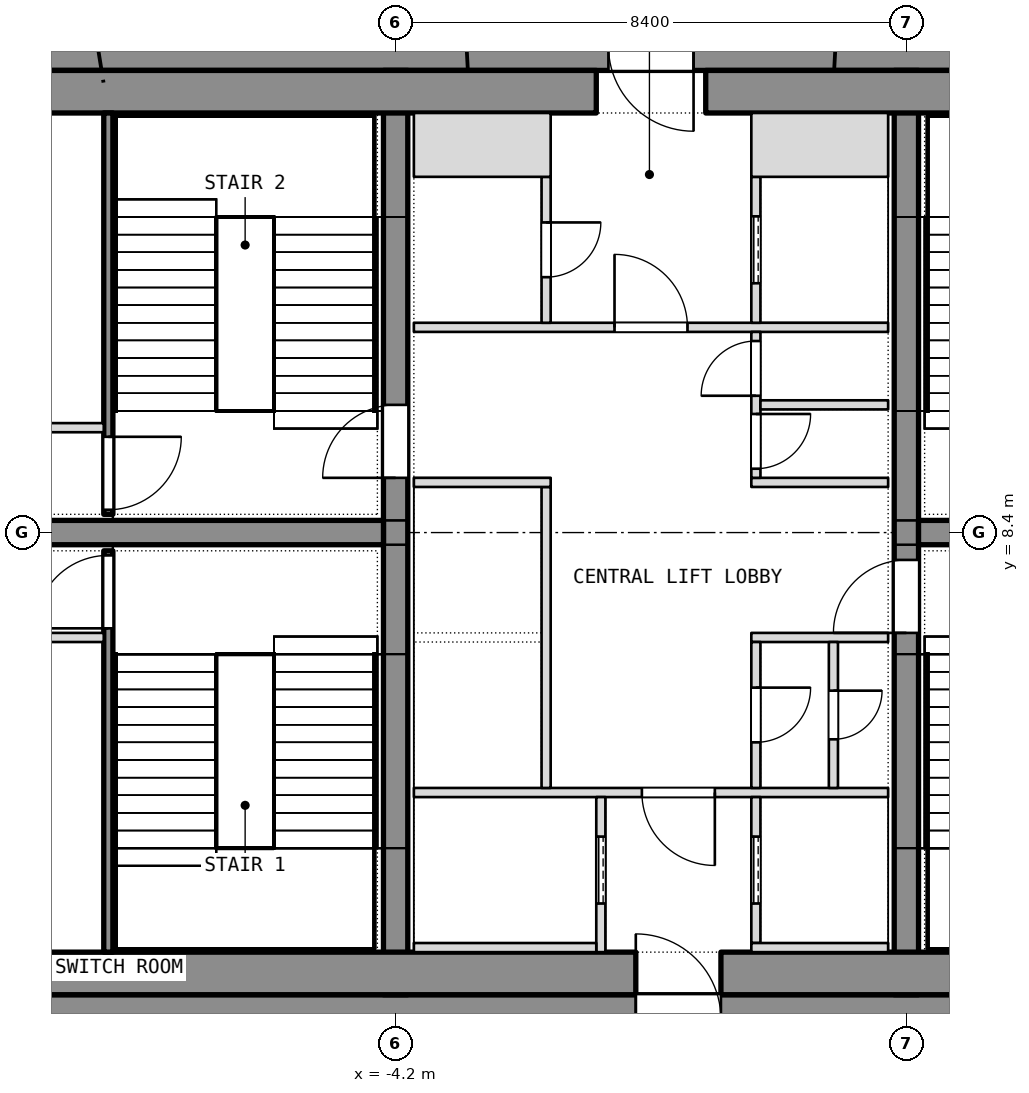
"""IFC4 building model, lengths in metres.
Left out: names, types, materials, properties, quantities, classifications, styles, units other than length and angle.
Written with IfcOpenShell. Run it as: python <this file> out.ifc"""

import sys

from ifc_helpers import new_model, si_unit, direction, frame, frame_2d, origin, place, context, subcontext, project, spatial, rectangle, extrude, element, fill, save


model = new_model("IFC4")
c1 = context("Model", 3, precision=1e-05, world=origin(), true_north=direction((0.0, 1.0)))
c2 = subcontext(c1, "Body", "Model", "MODEL_VIEW")
j1 = project(units=[si_unit("LENGTHUNIT", "METRE"), si_unit("PLANEANGLEUNIT", "RADIAN")], contexts=[c1])
p1 = place(None, origin())
s1 = spatial("IfcSite", under=j1, at=p1, CompositionType="ELEMENT")
p2 = place(p1, origin())
s2 = spatial("IfcBuilding", under=s1, at=p2, CompositionType="ELEMENT")
p3 = place(p2, frame((0.0, 0.0, 252.5)))
s3 = spatial("IfcBuildingStorey", under=s2, at=p3, CompositionType="ELEMENT", Elevation=252.5)
p4 = place(p3, frame((-11.1, 0.4, 0.0), z_axis=(0.0, 0.0, 1.0), x_axis=(1.0, 0.0, 0.0)))
e1 = element("IfcWall", 1, at=p4, inside=s3, PredefinedType="SHEAR", context=c2, shape_type="SweptSolid", body=[
    extrude(rectangle(XDim=22.2, YDim=0.8, at=frame_2d((11.1, 0.0))), origin(), (0.0, 0.0, 1.0), 14.4),
])
p5 = place(p4, frame((10.85, 0.0, 0.0)))
e2 = element("IfcOpeningElement", 2, at=p5, cuts=e1, PredefinedType="OPENING", context=c2, shape_type="SweptSolid", body=[
    extrude(rectangle(XDim=1.4, YDim=2.1, at=frame_2d((0.7, 1.05))), frame((0.0, 0.4, 0.0), z_axis=(0.0, -1.0, 0.0), x_axis=(1.0, 0.0, 0.0)), (0.0, 0.0, 1.0), 0.8),
])
p6 = place(p3, frame((-11.1, 16.4, 0.0), z_axis=(0.0, 0.0, 1.0), x_axis=(1.0, 0.0, 0.0)))
e3 = element("IfcWall", 3, at=p6, inside=s3, PredefinedType="SHEAR", context=c2, shape_type="SweptSolid", body=[
    extrude(rectangle(XDim=22.2, YDim=0.8, at=frame_2d((11.1, 0.0))), origin(), (0.0, 0.0, 1.0), 14.4),
])
p7 = place(p6, frame((10.4, 0.0, 0.0)))
e4 = element("IfcOpeningElement", 4, at=p7, cuts=e3, PredefinedType="OPENING", context=c2, shape_type="SweptSolid", body=[
    extrude(rectangle(XDim=1.4, YDim=2.1, at=frame_2d((0.7, 1.05))), frame((0.0, 0.4, 0.0), z_axis=(0.0, -1.0, 0.0), x_axis=(1.0, 0.0, 0.0)), (0.0, 0.0, 1.0), 0.8),
])
p8 = place(p3, frame((-4.2, 0.8, 0.0), z_axis=(0.0, 0.0, 1.0), x_axis=(0.0, 1.0, 0.0)))
e5 = element("IfcWall", 5, at=p8, inside=s3, PredefinedType="SHEAR", context=c2, shape_type="SweptSolid", body=[
    extrude(rectangle(XDim=15.2, YDim=0.4, at=frame_2d((7.6, 0.0))), origin(), (0.0, 0.0, 1.0), 14.4),
])
p9 = place(p8, frame((8.5, 0.0, 0.0)))
e6 = element("IfcOpeningElement", 6, at=p9, cuts=e5, PredefinedType="OPENING", context=c2, shape_type="SweptSolid", body=[
    extrude(rectangle(XDim=1.2, YDim=2.1, at=frame_2d((0.6, 1.05))), frame((0.0, 0.2, 0.0), z_axis=(0.0, -1.0, 0.0), x_axis=(1.0, 0.0, 0.0)), (0.0, 0.0, 1.0), 0.4),
])
p10 = place(p3, frame((4.2, 0.8, 0.0), z_axis=(0.0, 0.0, 1.0), x_axis=(0.0, 1.0, 0.0)))
e7 = element("IfcWall", 7, at=p10, inside=s3, PredefinedType="SHEAR", context=c2, shape_type="SweptSolid", body=[
    extrude(rectangle(XDim=15.2, YDim=0.4, at=frame_2d((7.6, 0.0))), origin(), (0.0, 0.0, 1.0), 14.4),
])
p11 = place(p10, frame((5.95, 0.0, 0.0)))
e8 = element("IfcOpeningElement", 8, at=p11, cuts=e7, PredefinedType="OPENING", context=c2, shape_type="SweptSolid", body=[
    extrude(rectangle(XDim=1.2, YDim=2.1, at=frame_2d((0.6, 1.05))), frame((0.0, 0.2, 0.0), z_axis=(0.0, -1.0, 0.0), x_axis=(1.0, 0.0, 0.0)), (0.0, 0.0, 1.0), 0.4),
])
for number, where, z_axis, x_axis in (
    (9, (-11.1, 8.4, 0.0), (0.0, 0.0, 1.0), (1.0, 0.0, 0.0)),
    (10, (4.4, 8.4, 0.0), (0.0, 0.0, 1.0), (1.0, 0.0, 0.0)),
):
    element("IfcWall", number, at=place(p3, frame(where, z_axis=z_axis, x_axis=x_axis)), inside=s3, PredefinedType="SHEAR", context=c2, shape_type="SweptSolid", body=[
        extrude(rectangle(XDim=6.7, YDim=0.4, at=frame_2d((3.35, 0.0))), origin(), (0.0, 0.0, 1.0), 14.4),
    ])
p12 = place(p3, frame((-11.1, 1.15, 0.0), z_axis=(0.0, 0.0, 1.0), x_axis=(1.0, 0.0, 0.0)))
e11 = element("IfcWall", 11, at=p12, inside=s3, PredefinedType="PARTITIONING", context=c2, shape_type="SweptSolid", body=[
    extrude(rectangle(XDim=10.85, YDim=0.7, at=frame_2d((5.425, 0.0))), origin(), (0.0, 0.0, 1.0), 14.14),
])
p13 = place(p3, frame((1.15, 1.15, 0.0), z_axis=(0.0, 0.0, 1.0), x_axis=(1.0, 0.0, 0.0)))
e12 = element("IfcWall", 12, at=p13, inside=s3, PredefinedType="PARTITIONING", context=c2, shape_type="SweptSolid", body=[
    extrude(rectangle(XDim=9.95, YDim=0.7, at=frame_2d((4.975, 0.0))), origin(), (0.0, 0.0, 1.0), 14.14),
])
for number, where, z_axis, x_axis in (
    (13, (-11.1, 15.65, 0.0), (0.0, 0.0, 1.0), (1.0, 0.0, 0.0)),
    (14, (0.9, 15.65, 0.0), (0.0, 0.0, 1.0), (1.0, 0.0, 0.0)),
):
    element("IfcWall", number, at=place(p3, frame(where, z_axis=z_axis, x_axis=x_axis)), inside=s3, PredefinedType="PARTITIONING", context=c2, shape_type="SweptSolid", body=[
        extrude(rectangle(XDim=10.2, YDim=0.7, at=frame_2d((5.1, 0.0))), origin(), (0.0, 0.0, 1.0), 14.14),
    ])
p14 = place(p3, frame((-8.925, 1.5, 0.0), z_axis=(0.0, 0.0, 1.0), x_axis=(0.0, 1.0, 0.0)))
e15 = element("IfcWall", 15, at=p14, inside=s3, PredefinedType="SHEAR", context=c2, shape_type="SweptSolid", body=[
    extrude(rectangle(XDim=6.6, YDim=0.15, at=frame_2d((3.3, 0.0))), origin(), (0.0, 0.0, 1.0), 14.14),
])
p15 = place(p14, frame((5.325, 0.0, 0.0)))
e16 = element("IfcOpeningElement", 16, at=p15, cuts=e15, PredefinedType="OPENING", context=c2, shape_type="SweptSolid", body=[
    extrude(rectangle(XDim=1.2, YDim=2.1, at=frame_2d((0.6, 1.05))), frame((0.0, 0.075, 0.0), z_axis=(0.0, -1.0, 0.0), x_axis=(1.0, 0.0, 0.0)), (0.0, 0.0, 1.0), 0.15),
])
p16 = place(p3, frame((-11.1, 6.675, 0.0), z_axis=(0.0, 0.0, 1.0), x_axis=(1.0, 0.0, 0.0)))
e17 = element("IfcWall", 17, at=p16, inside=s3, PredefinedType="PARTITIONING", context=c2, shape_type="SweptSolid", body=[
    extrude(rectangle(XDim=2.1, YDim=0.15, at=frame_2d((1.05, 0.0))), origin(), (0.0, 0.0, 1.0), 14.14),
])
p17 = place(p3, frame((-8.925, 8.7, 0.0), z_axis=(0.0, 0.0, 1.0), x_axis=(0.0, 1.0, 0.0)))
e18 = element("IfcWall", 18, at=p17, inside=s3, PredefinedType="SHEAR", context=c2, shape_type="SweptSolid", body=[
    extrude(rectangle(XDim=6.6, YDim=0.15, at=frame_2d((3.3, 0.0))), origin(), (0.0, 0.0, 1.0), 14.14),
])
p18 = place(p17, frame((0.075, 0.0, 0.0)))
e19 = element("IfcOpeningElement", 19, at=p18, cuts=e18, PredefinedType="OPENING", context=c2, shape_type="SweptSolid", body=[
    extrude(rectangle(XDim=1.2, YDim=2.1, at=frame_2d((0.6, 1.05))), frame((0.0, 0.075, 0.0), z_axis=(0.0, -1.0, 0.0), x_axis=(1.0, 0.0, 0.0)), (0.0, 0.0, 1.0), 0.15),
])
p19 = place(p3, frame((-11.1, 10.125, 0.0), z_axis=(0.0, 0.0, 1.0), x_axis=(1.0, 0.0, 0.0)))
e20 = element("IfcWall", 20, at=p19, inside=s3, PredefinedType="PARTITIONING", context=c2, shape_type="SweptSolid", body=[
    extrude(rectangle(XDim=2.1, YDim=0.15, at=frame_2d((1.05, 0.0))), origin(), (0.0, 0.0, 1.0), 14.14),
])
p20 = place(p3, frame((-3.9, 4.125, 0.0), z_axis=(0.0, 0.0, 1.0), x_axis=(1.0, 0.0, 0.0)))
e21 = element("IfcWall", 21, at=p20, inside=s3, PredefinedType="PARTITIONING", context=c2, shape_type="SweptSolid", body=[
    extrude(rectangle(XDim=7.8, YDim=0.15, at=frame_2d((3.9, 0.0))), origin(), (0.0, 0.0, 1.0), 14.14),
])
p21 = place(p20, frame((3.75, 0.0, 0.0)))
e22 = element("IfcOpeningElement", 22, at=p21, cuts=e21, PredefinedType="OPENING", context=c2, shape_type="SweptSolid", body=[
    extrude(rectangle(XDim=1.2, YDim=2.1, at=frame_2d((0.6, 1.05))), frame((0.0, 0.075, 0.0), z_axis=(0.0, -1.0, 0.0), x_axis=(1.0, 0.0, 0.0)), (0.0, 0.0, 1.0), 0.15),
])
p22 = place(p3, frame((-3.9, 11.775, 0.0), z_axis=(0.0, 0.0, 1.0), x_axis=(1.0, 0.0, 0.0)))
e23 = element("IfcWall", 23, at=p22, inside=s3, PredefinedType="PARTITIONING", context=c2, shape_type="SweptSolid", body=[
    extrude(rectangle(XDim=7.8, YDim=0.15, at=frame_2d((3.9, 0.0))), origin(), (0.0, 0.0, 1.0), 14.14),
])
p23 = place(p22, frame((3.3, 0.0, 0.0)))
e24 = element("IfcOpeningElement", 24, at=p23, cuts=e23, PredefinedType="OPENING", context=c2, shape_type="SweptSolid", body=[
    extrude(rectangle(XDim=1.2, YDim=2.1, at=frame_2d((0.6, 1.05))), frame((0.0, 0.075, 0.0), z_axis=(0.0, -1.0, 0.0), x_axis=(1.0, 0.0, 0.0)), (0.0, 0.0, 1.0), 0.15),
])
p24 = place(p3, frame((-0.825, 1.5, 0.0), z_axis=(0.0, 0.0, 1.0), x_axis=(0.0, 1.0, 0.0)))
e25 = element("IfcWall", 25, at=p24, inside=s3, PredefinedType="SHEAR", context=c2, shape_type="SweptSolid", body=[
    extrude(rectangle(XDim=2.55, YDim=0.15, at=frame_2d((1.275, 0.0))), origin(), (0.0, 0.0, 1.0), 14.4),
])
p25 = place(p24, frame((0.8, 0.0, 0.0)))
e26 = element("IfcOpeningElement", 26, at=p25, cuts=e25, PredefinedType="OPENING", context=c2, shape_type="SweptSolid", body=[
    extrude(rectangle(XDim=1.1, YDim=2.1, at=frame_2d((0.55, 1.05))), frame((0.0, 0.075, 0.0), z_axis=(0.0, -1.0, 0.0), x_axis=(1.0, 0.0, 0.0)), (0.0, 0.0, 1.0), 0.15),
])
p26 = place(p3, frame((-3.9, 1.575, 0.0), z_axis=(0.0, 0.0, 1.0), x_axis=(1.0, 0.0, 0.0)))
e27 = element("IfcWall", 27, at=p26, inside=s3, PredefinedType="SHEAR", context=c2, shape_type="SweptSolid", body=[
    extrude(rectangle(XDim=3.0, YDim=0.15, at=frame_2d((1.5, 0.0))), origin(), (0.0, 0.0, 1.0), 14.4),
])
p27 = place(p3, frame((-1.725, 4.2, 0.0), z_axis=(0.0, 0.0, 1.0), x_axis=(0.0, 1.0, 0.0)))
e28 = element("IfcWall", 28, at=p27, inside=s3, PredefinedType="SHEAR", context=c2, shape_type="SweptSolid", body=[
    extrude(rectangle(XDim=4.95, YDim=0.15, at=frame_2d((2.475, 0.0))), origin(), (0.0, 0.0, 1.0), 14.4),
])
p28 = place(p3, frame((-3.9, 9.225, 0.0), z_axis=(0.0, 0.0, 1.0), x_axis=(1.0, 0.0, 0.0)))
e29 = element("IfcWall", 29, at=p28, inside=s3, PredefinedType="SHEAR", context=c2, shape_type="SweptSolid", body=[
    extrude(rectangle(XDim=2.25, YDim=0.15, at=frame_2d((1.125, 0.0))), origin(), (0.0, 0.0, 1.0), 14.4),
])
p29 = place(p3, frame((-1.725, 11.85, 0.0), z_axis=(0.0, 0.0, 1.0), x_axis=(0.0, 1.0, 0.0)))
e30 = element("IfcWall", 30, at=p29, inside=s3, PredefinedType="PARTITIONING", context=c2, shape_type="SweptSolid", body=[
    extrude(rectangle(XDim=2.4, YDim=0.15, at=frame_2d((1.2, 0.0))), origin(), (0.0, 0.0, 1.0), 14.14),
])
p30 = place(p29, frame((0.75, 0.0, 0.0)))
e31 = element("IfcOpeningElement", 31, at=p30, cuts=e30, PredefinedType="OPENING", context=c2, shape_type="SweptSolid", body=[
    extrude(rectangle(XDim=0.9, YDim=2.1, at=frame_2d((0.45, 1.05))), frame((0.0, 0.075, 0.0), z_axis=(0.0, -1.0, 0.0), x_axis=(1.0, 0.0, 0.0)), (0.0, 0.0, 1.0), 0.15),
])
p31 = place(p3, frame((-3.9, 14.775, 0.0), z_axis=(0.0, 0.0, 1.0), x_axis=(1.0, 0.0, 0.0)))
e32 = element("IfcWall", 32, at=p31, inside=s3, PredefinedType="PARTITIONING", context=c2, shape_type="SweptSolid", body=[
    extrude(rectangle(XDim=2.25, YDim=1.05, at=frame_2d((1.125, 0.0))), origin(), (0.0, 0.0, 1.0), 14.14),
])
p32 = place(p3, frame((1.725, 1.65, 0.0), z_axis=(0.0, 0.0, 1.0), x_axis=(0.0, 1.0, 0.0)))
e33 = element("IfcWall", 33, at=p32, inside=s3, PredefinedType="SHEAR", context=c2, shape_type="SweptSolid", body=[
    extrude(rectangle(XDim=2.4, YDim=0.15, at=frame_2d((1.2, 0.0))), origin(), (0.0, 0.0, 1.0), 14.4),
])
p33 = place(p32, frame((0.65, 0.0, 0.0)))
e34 = element("IfcOpeningElement", 34, at=p33, cuts=e33, PredefinedType="OPENING", context=c2, shape_type="SweptSolid", body=[
    extrude(rectangle(XDim=1.1, YDim=2.1, at=frame_2d((0.55, 1.05))), frame((0.0, 0.075, 0.0), z_axis=(0.0, -1.0, 0.0), x_axis=(1.0, 0.0, 0.0)), (0.0, 0.0, 1.0), 0.15),
])
p34 = place(p3, frame((1.65, 1.575, 0.0), z_axis=(0.0, 0.0, 1.0), x_axis=(1.0, 0.0, 0.0)))
e35 = element("IfcWall", 35, at=p34, inside=s3, PredefinedType="SHEAR", context=c2, shape_type="SweptSolid", body=[
    extrude(rectangle(XDim=2.25, YDim=0.15, at=frame_2d((1.125, 0.0))), origin(), (0.0, 0.0, 1.0), 14.4),
])
p35 = place(p3, frame((1.725, 11.85, 0.0), z_axis=(0.0, 0.0, 1.0), x_axis=(0.0, 1.0, 0.0)))
e36 = element("IfcWall", 36, at=p35, inside=s3, PredefinedType="SHEAR", context=c2, shape_type="SweptSolid", body=[
    extrude(rectangle(XDim=2.4, YDim=0.15, at=frame_2d((1.2, 0.0))), origin(), (0.0, 0.0, 1.0), 14.4),
])
p36 = place(p35, frame((0.65, 0.0, 0.0)))
e37 = element("IfcOpeningElement", 37, at=p36, cuts=e36, PredefinedType="OPENING", context=c2, shape_type="SweptSolid", body=[
    extrude(rectangle(XDim=1.1, YDim=2.1, at=frame_2d((0.55, 1.05))), frame((0.0, 0.075, 0.0), z_axis=(0.0, -1.0, 0.0), x_axis=(1.0, 0.0, 0.0)), (0.0, 0.0, 1.0), 0.15),
])
p37 = place(p3, frame((1.65, 14.775, 0.0), z_axis=(0.0, 0.0, 1.0), x_axis=(1.0, 0.0, 0.0)))
e38 = element("IfcWall", 38, at=p37, inside=s3, PredefinedType="SHEAR", context=c2, shape_type="SweptSolid", body=[
    extrude(rectangle(XDim=2.25, YDim=1.05, at=frame_2d((1.125, 0.0))), origin(), (0.0, 0.0, 1.0), 14.4),
])
for number, where, z_axis, x_axis in (
    (39, (1.65, 6.675, 0.0), (0.0, 0.0, 1.0), (1.0, 0.0, 0.0)),
    (40, (1.65, 9.225, 0.0), (0.0, 0.0, 1.0), (1.0, 0.0, 0.0)),
):
    element("IfcWall", number, at=place(p3, frame(where, z_axis=z_axis, x_axis=x_axis)), inside=s3, PredefinedType="PARTITIONING", context=c2, shape_type="SweptSolid", body=[
        extrude(rectangle(XDim=2.25, YDim=0.15, at=frame_2d((1.125, 0.0))), origin(), (0.0, 0.0, 1.0), 14.14),
    ])
p38 = place(p3, frame((1.725, 4.2, 0.0), z_axis=(0.0, 0.0, 1.0), x_axis=(0.0, 1.0, 0.0)))
e41 = element("IfcWall", 41, at=p38, inside=s3, PredefinedType="PARTITIONING", context=c2, shape_type="SweptSolid", body=[
    extrude(rectangle(XDim=2.4, YDim=0.15, at=frame_2d((1.2, 0.0))), origin(), (0.0, 0.0, 1.0), 14.14),
])
p39 = place(p38, frame((0.75, 0.0, 0.0)))
e42 = element("IfcOpeningElement", 42, at=p39, cuts=e41, PredefinedType="OPENING", context=c2, shape_type="SweptSolid", body=[
    extrude(rectangle(XDim=0.9, YDim=2.1, at=frame_2d((0.45, 1.05))), frame((0.0, 0.075, 0.0), z_axis=(0.0, -1.0, 0.0), x_axis=(1.0, 0.0, 0.0)), (0.0, 0.0, 1.0), 0.15),
])
p40 = place(p3, frame((1.725, 9.3, 0.0), z_axis=(0.0, 0.0, 1.0), x_axis=(0.0, 1.0, 0.0)))
e43 = element("IfcWall", 43, at=p40, inside=s3, PredefinedType="PARTITIONING", context=c2, shape_type="SweptSolid", body=[
    extrude(rectangle(XDim=2.4, YDim=0.15, at=frame_2d((1.2, 0.0))), origin(), (0.0, 0.0, 1.0), 14.14),
])
p41 = place(p40, frame((0.15, 0.0, 0.0)))
e44 = element("IfcOpeningElement", 44, at=p41, cuts=e43, PredefinedType="OPENING", context=c2, shape_type="SweptSolid", body=[
    extrude(rectangle(XDim=0.9, YDim=2.1, at=frame_2d((0.45, 1.05))), frame((0.0, 0.075, 0.0), z_axis=(0.0, -1.0, 0.0), x_axis=(1.0, 0.0, 0.0)), (0.0, 0.0, 1.0), 0.15),
])
p42 = place(p40, frame((1.35, 0.0, 0.0)))
e45 = element("IfcOpeningElement", 45, at=p42, cuts=e43, PredefinedType="OPENING", context=c2, shape_type="SweptSolid", body=[
    extrude(rectangle(XDim=0.9, YDim=2.1, at=frame_2d((0.45, 1.05))), frame((0.0, 0.075, 0.0), z_axis=(0.0, -1.0, 0.0), x_axis=(1.0, 0.0, 0.0)), (0.0, 0.0, 1.0), 0.15),
])
p43 = place(p3, frame((3.0, 4.2, 0.0), z_axis=(0.0, 0.0, 1.0), x_axis=(0.0, 1.0, 0.0)))
e46 = element("IfcWall", 46, at=p43, inside=s3, PredefinedType="PARTITIONING", context=c2, shape_type="SweptSolid", body=[
    extrude(rectangle(XDim=2.4, YDim=0.15, at=frame_2d((1.2, 0.0))), origin(), (0.0, 0.0, 1.0), 14.14),
])
p44 = place(p43, frame((0.8, 0.0, 0.0)))
e47 = element("IfcOpeningElement", 47, at=p44, cuts=e46, PredefinedType="OPENING", context=c2, shape_type="SweptSolid", body=[
    extrude(rectangle(XDim=0.8, YDim=2.1, at=frame_2d((0.4, 1.05))), frame((0.0, 0.075, 0.0), z_axis=(0.0, -1.0, 0.0), x_axis=(1.0, 0.0, 0.0)), (0.0, 0.0, 1.0), 0.15),
])
p45 = place(p3, frame((1.8, 10.5, 0.0), z_axis=(0.0, 0.0, 1.0), x_axis=(1.0, 0.0, 0.0)))
e48 = element("IfcWall", 48, at=p45, inside=s3, PredefinedType="PARTITIONING", context=c2, shape_type="SweptSolid", body=[
    extrude(rectangle(XDim=2.1, YDim=0.15, at=frame_2d((1.05, 0.0))), origin(), (0.0, 0.0, 1.0), 14.14),
])
p46 = place(p15, origin())
e49 = element("IfcDoor", 49, at=p46, inside=s3, OperationType="SINGLE_SWING_LEFT", PredefinedType="DOOR", context=c2, shape_type="SweptSolid", body=[
    extrude(rectangle(XDim=1.2, YDim=2.1, at=frame_2d((0.6, 1.05))), frame((0.0, 0.025, 0.0), z_axis=(0.0, -1.0, 0.0), x_axis=(1.0, 0.0, 0.0)), (0.0, 0.0, 1.0), 0.05),
])
fill(e16, e49)
p47 = place(p18, origin())
e50 = element("IfcDoor", 50, at=p47, inside=s3, OperationType="SINGLE_SWING_LEFT", PredefinedType="DOOR", context=c2, shape_type="SweptSolid", body=[
    extrude(rectangle(XDim=1.2, YDim=2.1, at=frame_2d((0.6, 1.05))), frame((0.0, 0.025, 0.0), z_axis=(0.0, -1.0, 0.0), x_axis=(1.0, 0.0, 0.0)), (0.0, 0.0, 1.0), 0.05),
])
fill(e19, e50)
p48 = place(p39, origin())
e51 = element("IfcDoor", 51, at=p48, inside=s3, OperationType="SINGLE_SWING_LEFT", PredefinedType="DOOR", context=c2, shape_type="SweptSolid", body=[
    extrude(rectangle(XDim=0.9, YDim=2.1, at=frame_2d((0.45, 1.05))), frame((0.0, 0.025, 0.0), z_axis=(0.0, -1.0, 0.0), x_axis=(1.0, 0.0, 0.0)), (0.0, 0.0, 1.0), 0.05),
])
fill(e42, e51)
p49 = place(p44, origin())
e52 = element("IfcDoor", 52, at=p49, inside=s3, OperationType="SINGLE_SWING_LEFT", PredefinedType="DOOR", context=c2, shape_type="SweptSolid", body=[
    extrude(rectangle(XDim=0.8, YDim=2.1, at=frame_2d((0.4, 1.05))), frame((0.0, 0.025, 0.0), z_axis=(0.0, -1.0, 0.0), x_axis=(1.0, 0.0, 0.0)), (0.0, 0.0, 1.0), 0.05),
])
fill(e47, e52)
p50 = place(p41, origin())
e53 = element("IfcDoor", 53, at=p50, inside=s3, OperationType="SINGLE_SWING_LEFT", PredefinedType="DOOR", context=c2, shape_type="SweptSolid", body=[
    extrude(rectangle(XDim=0.9, YDim=2.1, at=frame_2d((0.45, 1.05))), frame((0.0, 0.025, 0.0), z_axis=(0.0, -1.0, 0.0), x_axis=(1.0, 0.0, 0.0)), (0.0, 0.0, 1.0), 0.05),
])
fill(e44, e53)
p51 = place(p42, origin())
e54 = element("IfcDoor", 54, at=p51, inside=s3, OperationType="SINGLE_SWING_LEFT", PredefinedType="DOOR", context=c2, shape_type="SweptSolid", body=[
    extrude(rectangle(XDim=0.9, YDim=2.1, at=frame_2d((0.45, 1.05))), frame((0.0, 0.025, 0.0), z_axis=(0.0, -1.0, 0.0), x_axis=(1.0, 0.0, 0.0)), (0.0, 0.0, 1.0), 0.05),
])
fill(e45, e54)
p52 = place(p25, origin())
e55 = element("IfcDoor", 55, at=p52, inside=s3, OperationType="SLIDING_TO_LEFT", PredefinedType="DOOR", context=c2, shape_type="SweptSolid", body=[
    extrude(rectangle(XDim=1.1, YDim=2.1, at=frame_2d((0.55, 1.05))), frame((0.0, 0.025, 0.0), z_axis=(0.0, -1.0, 0.0), x_axis=(1.0, 0.0, 0.0)), (0.0, 0.0, 1.0), 0.05),
])
fill(e26, e55)
p53 = place(p33, origin())
e56 = element("IfcDoor", 56, at=p53, inside=s3, OperationType="SLIDING_TO_LEFT", PredefinedType="DOOR", context=c2, shape_type="SweptSolid", body=[
    extrude(rectangle(XDim=1.1, YDim=2.1, at=frame_2d((0.55, 1.05))), frame((0.0, 0.025, 0.0), z_axis=(0.0, -1.0, 0.0), x_axis=(1.0, 0.0, 0.0)), (0.0, 0.0, 1.0), 0.05),
])
fill(e34, e56)
p54 = place(p36, origin())
e57 = element("IfcDoor", 57, at=p54, inside=s3, OperationType="SLIDING_TO_LEFT", PredefinedType="DOOR", context=c2, shape_type="SweptSolid", body=[
    extrude(rectangle(XDim=1.1, YDim=2.1, at=frame_2d((0.55, 1.05))), frame((0.0, 0.025, 0.0), z_axis=(0.0, -1.0, 0.0), x_axis=(1.0, 0.0, 0.0)), (0.0, 0.0, 1.0), 0.05),
])
fill(e37, e57)
p55 = place(p21, origin())
e58 = element("IfcDoor", 58, at=p55, inside=s3, OperationType="SINGLE_SWING_LEFT", PredefinedType="DOOR", context=c2, shape_type="SweptSolid", body=[
    extrude(rectangle(XDim=1.2, YDim=2.1, at=frame_2d((0.6, 1.05))), frame((0.0, 0.025, 0.0), z_axis=(0.0, -1.0, 0.0), x_axis=(1.0, 0.0, 0.0)), (0.0, 0.0, 1.0), 0.05),
])
fill(e22, e58)
p56 = place(p23, origin())
e59 = element("IfcDoor", 59, at=p56, inside=s3, OperationType="SINGLE_SWING_LEFT", PredefinedType="DOOR", context=c2, shape_type="SweptSolid", body=[
    extrude(rectangle(XDim=1.2, YDim=2.1, at=frame_2d((0.6, 1.05))), frame((0.0, 0.025, 0.0), z_axis=(0.0, -1.0, 0.0), x_axis=(1.0, 0.0, 0.0)), (0.0, 0.0, 1.0), 0.05),
])
fill(e24, e59)
p57 = place(p30, origin())
e60 = element("IfcDoor", 60, at=p57, inside=s3, OperationType="SINGLE_SWING_LEFT", PredefinedType="DOOR", context=c2, shape_type="SweptSolid", body=[
    extrude(rectangle(XDim=0.9, YDim=2.1, at=frame_2d((0.45, 1.05))), frame((0.0, 0.025, 0.0), z_axis=(0.0, -1.0, 0.0), x_axis=(1.0, 0.0, 0.0)), (0.0, 0.0, 1.0), 0.05),
])
fill(e31, e60)
p58 = place(p9, origin())
e61 = element("IfcDoor", 61, at=p58, inside=s3, OperationType="SINGLE_SWING_LEFT", PredefinedType="DOOR", context=c2, shape_type="SweptSolid", body=[
    extrude(rectangle(XDim=1.2, YDim=2.1, at=frame_2d((0.6, 1.05))), frame((0.0, 0.025, 0.0), z_axis=(0.0, -1.0, 0.0), x_axis=(1.0, 0.0, 0.0)), (0.0, 0.0, 1.0), 0.05),
])
fill(e6, e61)
p59 = place(p11, origin())
e62 = element("IfcDoor", 62, at=p59, inside=s3, OperationType="SINGLE_SWING_LEFT", PredefinedType="DOOR", context=c2, shape_type="SweptSolid", body=[
    extrude(rectangle(XDim=1.2, YDim=2.1, at=frame_2d((0.6, 1.05))), frame((0.0, 0.025, 0.0), z_axis=(0.0, -1.0, 0.0), x_axis=(1.0, 0.0, 0.0)), (0.0, 0.0, 1.0), 0.05),
])
fill(e8, e62)
save(model, sys.argv[1])
